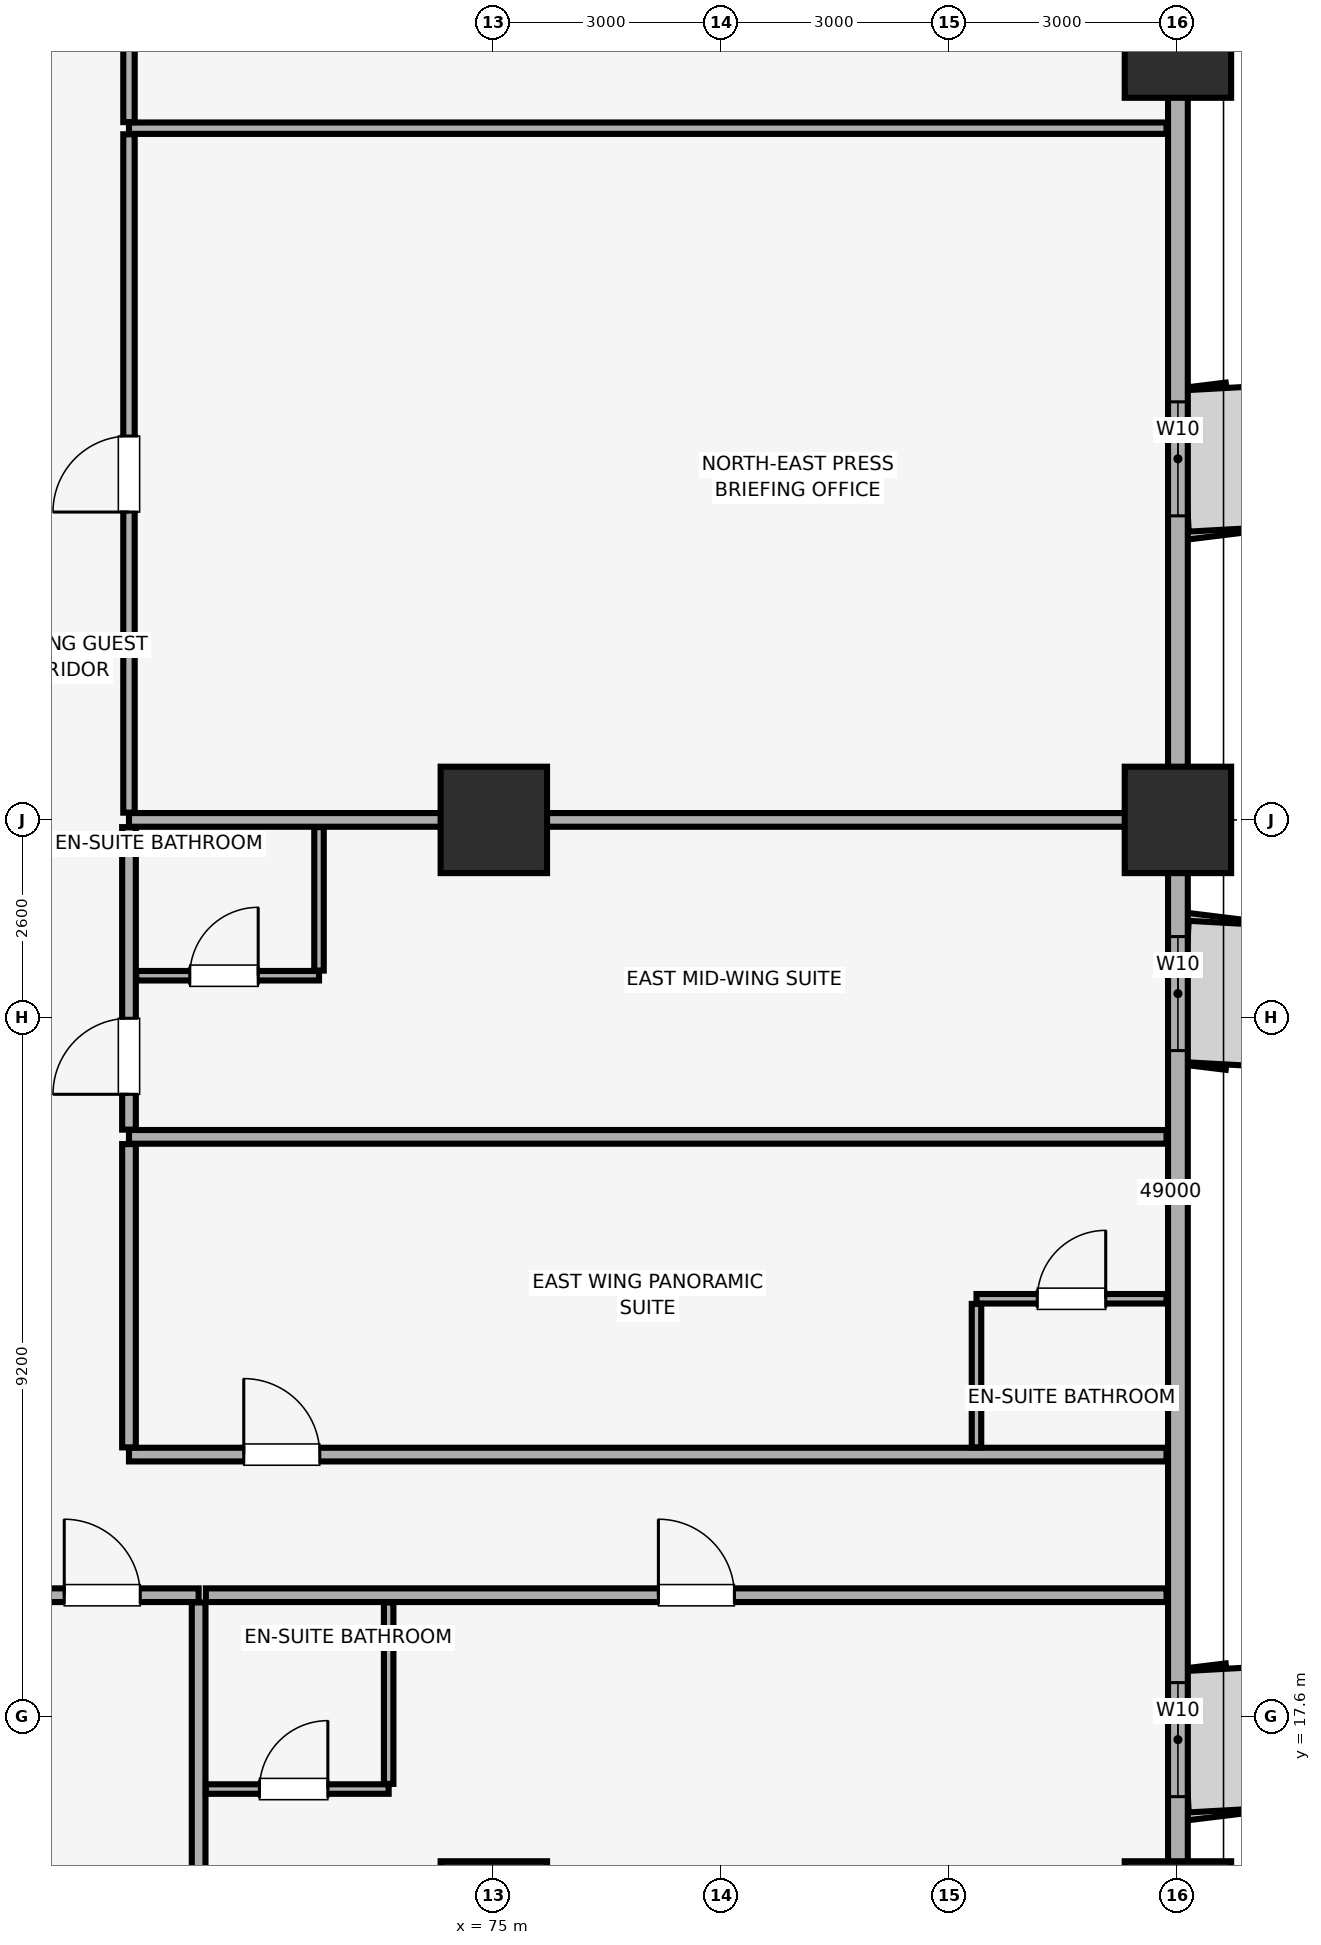
"""IFC4 building model, lengths in metres.
Left out: names, types, materials, properties, quantities, classifications, styles, units other than length and angle.
Written with IfcOpenShell. Run it as: python <this file> out.ifc"""

import sys

from ifc_helpers import new_model, si_unit, direction, frame, frame_2d, origin, origin_2d, place, context, subcontext, project, spatial, rectangle, extrude, element, fill, save


model = new_model("IFC4")
c1 = context("Model", 3, precision=1e-05, world=origin(), true_north=direction((0.0, 1.0)))
c2 = subcontext(c1, "Body", "Model", "MODEL_VIEW")
j1 = project(units=[si_unit("LENGTHUNIT", "METRE"), si_unit("PLANEANGLEUNIT", "RADIAN")], contexts=[c1])
p1 = place(None, origin())
s1 = spatial("IfcSite", under=j1, at=p1, CompositionType="ELEMENT")
p2 = place(p1, origin())
s2 = spatial("IfcBuilding", under=s1, at=p2, CompositionType="ELEMENT")
p3 = place(p2, frame((0.0, 0.0, 72.65)))
s3 = spatial("IfcBuildingStorey", under=s2, at=p3, CompositionType="ELEMENT", Elevation=72.65)
for number, where, z_axis, x_axis in (
    (1, (84.0, 15.0, 0.0), (0.0, 0.0, 1.0), (1.0, 0.0, 0.0)),
    (2, (84.0, 29.4, 0.0), (0.0, 0.0, 1.0), (1.0, 0.0, 0.0)),
    (3, (84.0, 39.6, 0.0), (0.0, 0.0, 1.0), (1.0, 0.0, 0.0)),
    (4, (75.0, 15.0, 0.0), (0.0, 0.0, 1.0), (1.0, 0.0, 0.0)),
    (5, (75.0, 29.4, 0.0), (0.0, 0.0, 1.0), (1.0, 0.0, 0.0)),
):
    element("IfcColumn", number, at=place(p3, frame(where, z_axis=z_axis, x_axis=x_axis)), inside=s3, PredefinedType="COLUMN", context=c2, shape_type="SweptSolid", body=[
        extrude(rectangle(XDim=1.4, YDim=1.4, at=origin_2d()), origin(), (0.0, 0.0, 1.0), 3.51),
    ])
p4 = place(p3, frame((84.0, 4.2, 0.0), z_axis=(0.0, 0.0, 1.0), x_axis=(0.0, 1.0, 0.0)))
e6 = element("IfcWall", 6, at=p4, inside=s3, PredefinedType="SOLIDWALL", context=c2, shape_type="SweptSolid", body=[
    extrude(rectangle(XDim=40.6, YDim=0.26, at=frame_2d((20.3, 0.0))), origin(), (0.0, 0.0, 1.0), 2.56),
])
p5 = place(p4, frame((6.05, 0.0, 0.85)))
e7 = element("IfcOpeningElement", 7, at=p5, cuts=e6, PredefinedType="OPENING", context=c2, shape_type="SweptSolid", body=[
    extrude(rectangle(XDim=1.5, YDim=1.4, at=frame_2d((0.75, 0.7))), frame((0.0, 0.14, 0.0), z_axis=(0.0, -1.0, 0.0), x_axis=(1.0, 0.0, 0.0)), (0.0, 0.0, 1.0), 0.28),
])
p6 = place(p4, frame((12.35, 0.0, 0.85)))
e8 = element("IfcOpeningElement", 8, at=p6, cuts=e6, PredefinedType="OPENING", context=c2, shape_type="SweptSolid", body=[
    extrude(rectangle(XDim=1.5, YDim=1.4, at=frame_2d((0.75, 0.7))), frame((0.0, 0.14, 0.0), z_axis=(0.0, -1.0, 0.0), x_axis=(1.0, 0.0, 0.0)), (0.0, 0.0, 1.0), 0.28),
])
p7 = place(p4, frame((22.165, 0.0, 0.85)))
e9 = element("IfcOpeningElement", 9, at=p7, cuts=e6, PredefinedType="OPENING", context=c2, shape_type="SweptSolid", body=[
    extrude(rectangle(XDim=1.5, YDim=1.4, at=frame_2d((0.75, 0.7))), frame((0.0, 0.14, 0.0), z_axis=(0.0, -1.0, 0.0), x_axis=(1.0, 0.0, 0.0)), (0.0, 0.0, 1.0), 0.28),
])
p8 = place(p4, frame((29.2, 0.0, 0.85)))
e10 = element("IfcOpeningElement", 10, at=p8, cuts=e6, PredefinedType="OPENING", context=c2, shape_type="SweptSolid", body=[
    extrude(rectangle(XDim=1.5, YDim=1.4, at=frame_2d((0.75, 0.7))), frame((0.0, 0.14, 0.0), z_axis=(0.0, -1.0, 0.0), x_axis=(1.0, 0.0, 0.0)), (0.0, 0.0, 1.0), 0.28),
])
p9 = place(p4, frame((37.365, 0.0, 0.85)))
e11 = element("IfcOpeningElement", 11, at=p9, cuts=e6, PredefinedType="OPENING", context=c2, shape_type="SweptSolid", body=[
    extrude(rectangle(XDim=1.5, YDim=1.4, at=frame_2d((0.75, 0.7))), frame((0.0, 0.14, 0.0), z_axis=(0.0, -1.0, 0.0), x_axis=(1.0, 0.0, 0.0)), (0.0, 0.0, 1.0), 0.28),
])
p10 = place(p3, frame((62.878, 19.2, 0.0), z_axis=(0.0, 0.0, 1.0), x_axis=(1.0, 0.0, 0.0)))
e12 = element("IfcWall", 12, at=p10, inside=s3, PredefinedType="PARTITIONING", context=c2, shape_type="SweptSolid", body=[
    extrude(rectangle(XDim=8.238, YDim=0.18, at=frame_2d((4.119, 0.0))), origin(), (0.0, 0.0, 1.0), 3.51),
])
p11 = place(p10, frame((6.47, 0.0, 0.0)))
e13 = element("IfcOpeningElement", 13, at=p11, cuts=e12, PredefinedType="OPENING", context=c2, shape_type="SweptSolid", body=[
    extrude(rectangle(XDim=1.0, YDim=2.15, at=frame_2d((0.5, 1.075))), frame((0.0, 0.1, 0.0), z_axis=(0.0, -1.0, 0.0), x_axis=(1.0, 0.0, 0.0)), (0.0, 0.0, 1.0), 0.2),
])
p12 = place(p3, frame((71.116, 0.15, 0.0), z_axis=(0.0, 0.0, 1.0), x_axis=(0.0, 1.0, 0.0)))
e14 = element("IfcWall", 14, at=p12, inside=s3, PredefinedType="PARTITIONING", context=c2, shape_type="SweptSolid", body=[
    extrude(rectangle(XDim=18.955, YDim=0.18, at=frame_2d((9.478, 0.0))), origin(), (0.0, 0.0, 1.0), 2.898),
])
p13 = place(p3, frame((71.211, 19.2, 0.0), z_axis=(0.0, 0.0, 1.0), x_axis=(1.0, 0.0, 0.0)))
e15 = element("IfcWall", 15, at=p13, inside=s3, PredefinedType="PARTITIONING", context=c2, shape_type="SweptSolid", body=[
    extrude(rectangle(XDim=12.639, YDim=0.18, at=frame_2d((6.319, 0.0))), origin(), (0.0, 0.0, 1.0), 3.51),
])
p14 = place(p13, frame((5.954, 0.0, 0.0)))
e16 = element("IfcOpeningElement", 16, at=p14, cuts=e15, PredefinedType="OPENING", context=c2, shape_type="SweptSolid", body=[
    extrude(rectangle(XDim=1.0, YDim=2.15, at=frame_2d((0.5, 1.075))), frame((0.0, 0.1, 0.0), z_axis=(0.0, -1.0, 0.0), x_axis=(1.0, 0.0, 0.0)), (0.0, 0.0, 1.0), 0.2),
])
p15 = place(p3, frame((71.211, 16.65, 0.0), z_axis=(0.0, 0.0, 1.0), x_axis=(1.0, 0.0, 0.0)))
e17 = element("IfcWall", 17, at=p15, inside=s3, PredefinedType="PARTITIONING", context=c2, shape_type="SweptSolid", body=[
    extrude(rectangle(XDim=2.405, YDim=0.125, at=frame_2d((1.203, 0.0))), origin(), (0.0, 0.0, 1.0), 3.51),
])
p16 = place(p15, frame((0.705, 0.0, 0.0)))
e18 = element("IfcOpeningElement", 18, at=p16, cuts=e17, PredefinedType="OPENING", context=c2, shape_type="SweptSolid", body=[
    extrude(rectangle(XDim=0.9, YDim=2.1, at=frame_2d((0.45, 1.05))), frame((0.0, 0.073, 0.0), z_axis=(0.0, -1.0, 0.0), x_axis=(1.0, 0.0, 0.0)), (0.0, 0.0, 1.0), 0.145),
])
p17 = place(p3, frame((73.616, 16.718, 0.0), z_axis=(0.0, 0.0, 1.0), x_axis=(0.0, 1.0, 0.0)))
e19 = element("IfcWall", 19, at=p17, inside=s3, PredefinedType="PARTITIONING", context=c2, shape_type="SweptSolid", body=[
    extrude(rectangle(XDim=2.387, YDim=0.125, at=frame_2d((1.194, 0.0))), origin(), (0.0, 0.0, 1.0), 3.51),
])
p18 = place(p3, frame((70.2, 21.05, 0.0), z_axis=(0.0, 0.0, 1.0), x_axis=(1.0, 0.0, 0.0)))
e20 = element("IfcWall", 20, at=p18, inside=s3, PredefinedType="PARTITIONING", context=c2, shape_type="SweptSolid", body=[
    extrude(rectangle(XDim=13.65, YDim=0.18, at=frame_2d((6.825, 0.0))), origin(), (0.0, 0.0, 1.0), 3.51),
])
p19 = place(p18, frame((1.51, 0.0, 0.0)))
e21 = element("IfcOpeningElement", 21, at=p19, cuts=e20, PredefinedType="OPENING", context=c2, shape_type="SweptSolid", body=[
    extrude(rectangle(XDim=1.0, YDim=2.15, at=frame_2d((0.5, 1.075))), frame((0.0, 0.1, 0.0), z_axis=(0.0, -1.0, 0.0), x_axis=(1.0, 0.0, 0.0)), (0.0, 0.0, 1.0), 0.2),
])
p20 = place(p3, frame((70.2, 25.23, 0.0), z_axis=(0.0, 0.0, 1.0), x_axis=(1.0, 0.0, 0.0)))
e22 = element("IfcWall", 22, at=p20, inside=s3, PredefinedType="PARTITIONING", context=c2, shape_type="SweptSolid", body=[
    extrude(rectangle(XDim=13.65, YDim=0.18, at=frame_2d((6.825, 0.0))), origin(), (0.0, 0.0, 1.0), 3.51),
])
p21 = place(p3, frame((70.2, 21.145, 0.0), z_axis=(0.0, 0.0, 1.0), x_axis=(0.0, 1.0, 0.0)))
e23 = element("IfcWall", 23, at=p21, inside=s3, PredefinedType="PARTITIONING", context=c2, shape_type="SweptSolid", body=[
    extrude(rectangle(XDim=3.99, YDim=0.18, at=frame_2d((1.995, 0.0))), origin(), (0.0, 0.0, 1.0), 3.51),
])
p22 = place(p3, frame((81.35, 23.1, 0.0), z_axis=(0.0, 0.0, 1.0), x_axis=(1.0, 0.0, 0.0)))
e24 = element("IfcWall", 24, at=p22, inside=s3, PredefinedType="PARTITIONING", context=c2, shape_type="SweptSolid", body=[
    extrude(rectangle(XDim=2.5, YDim=0.125, at=frame_2d((1.25, 0.0))), origin(), (0.0, 0.0, 1.0), 3.51),
])
p23 = place(p22, frame((0.8, 0.0, 0.0)))
e25 = element("IfcOpeningElement", 25, at=p23, cuts=e24, PredefinedType="OPENING", context=c2, shape_type="SweptSolid", body=[
    extrude(rectangle(XDim=0.9, YDim=2.1, at=frame_2d((0.45, 1.05))), frame((0.0, 0.073, 0.0), z_axis=(0.0, -1.0, 0.0), x_axis=(1.0, 0.0, 0.0)), (0.0, 0.0, 1.0), 0.145),
])
p24 = place(p3, frame((81.35, 21.145, 0.0), z_axis=(0.0, 0.0, 1.0), x_axis=(0.0, 1.0, 0.0)))
e26 = element("IfcWall", 26, at=p24, inside=s3, PredefinedType="PARTITIONING", context=c2, shape_type="SweptSolid", body=[
    extrude(rectangle(XDim=1.887, YDim=0.125, at=frame_2d((0.944, 0.0))), origin(), (0.0, 0.0, 1.0), 3.51),
])
p25 = place(p3, frame((70.2, 29.4, 0.0), z_axis=(0.0, 0.0, 1.0), x_axis=(1.0, 0.0, 0.0)))
e27 = element("IfcWall", 27, at=p25, inside=s3, PredefinedType="PARTITIONING", context=c2, shape_type="SweptSolid", body=[
    extrude(rectangle(XDim=13.65, YDim=0.18, at=frame_2d((6.825, 0.0))), origin(), (0.0, 0.0, 1.0), 2.86),
])
p26 = place(p3, frame((70.2, 25.325, 0.0), z_axis=(0.0, 0.0, 1.0), x_axis=(0.0, 1.0, 0.0)))
e28 = element("IfcWall", 28, at=p26, inside=s3, PredefinedType="PARTITIONING", context=c2, shape_type="SweptSolid", body=[
    extrude(rectangle(XDim=3.98, YDim=0.18, at=frame_2d((1.99, 0.0))), origin(), (0.0, 0.0, 1.0), 3.51),
])
p27 = place(p26, frame((0.465, 0.0, 0.0)))
e29 = element("IfcOpeningElement", 29, at=p27, cuts=e28, PredefinedType="OPENING", context=c2, shape_type="SweptSolid", body=[
    extrude(rectangle(XDim=1.0, YDim=2.15, at=frame_2d((0.5, 1.075))), frame((0.0, 0.1, 0.0), z_axis=(0.0, -1.0, 0.0), x_axis=(1.0, 0.0, 0.0)), (0.0, 0.0, 1.0), 0.2),
])
p28 = place(p3, frame((70.295, 27.35, 0.0), z_axis=(0.0, 0.0, 1.0), x_axis=(1.0, 0.0, 0.0)))
e30 = element("IfcWall", 30, at=p28, inside=s3, PredefinedType="PARTITIONING", context=c2, shape_type="SweptSolid", body=[
    extrude(rectangle(XDim=2.405, YDim=0.125, at=frame_2d((1.203, 0.0))), origin(), (0.0, 0.0, 1.0), 3.51),
])
p29 = place(p28, frame((0.705, 0.0, 0.0)))
e31 = element("IfcOpeningElement", 31, at=p29, cuts=e30, PredefinedType="OPENING", context=c2, shape_type="SweptSolid", body=[
    extrude(rectangle(XDim=0.9, YDim=2.1, at=frame_2d((0.45, 1.05))), frame((0.0, 0.073, 0.0), z_axis=(0.0, -1.0, 0.0), x_axis=(1.0, 0.0, 0.0)), (0.0, 0.0, 1.0), 0.145),
])
p30 = place(p3, frame((72.7, 27.417, 0.0), z_axis=(0.0, 0.0, 1.0), x_axis=(0.0, 1.0, 0.0)))
e32 = element("IfcWall", 32, at=p30, inside=s3, PredefinedType="PARTITIONING", context=c2, shape_type="SweptSolid", body=[
    extrude(rectangle(XDim=1.887, YDim=0.125, at=frame_2d((0.944, 0.0))), origin(), (0.0, 0.0, 1.0), 3.51),
])
p31 = place(p3, frame((70.2, 38.5, 0.0), z_axis=(0.0, 0.0, 1.0), x_axis=(1.0, 0.0, 0.0)))
e33 = element("IfcWall", 33, at=p31, inside=s3, PredefinedType="PARTITIONING", context=c2, shape_type="SweptSolid", body=[
    extrude(rectangle(XDim=13.65, YDim=0.15, at=frame_2d((6.825, 0.0))), origin(), (0.0, 0.0, 1.0), 3.51),
])
p32 = place(p3, frame((70.2, 29.495, 0.0), z_axis=(0.0, 0.0, 1.0), x_axis=(0.0, 1.0, 0.0)))
e34 = element("IfcWall", 34, at=p32, inside=s3, PredefinedType="PARTITIONING", context=c2, shape_type="SweptSolid", body=[
    extrude(rectangle(XDim=8.925, YDim=0.15, at=frame_2d((4.462, 0.0))), origin(), (0.0, 0.0, 1.0), 3.51),
])
p33 = place(p32, frame((3.955, 0.0, 0.0)))
e35 = element("IfcOpeningElement", 35, at=p33, cuts=e34, PredefinedType="OPENING", context=c2, shape_type="SweptSolid", body=[
    extrude(rectangle(XDim=1.0, YDim=2.15, at=frame_2d((0.5, 1.075))), frame((0.0, 0.085, 0.0), z_axis=(0.0, -1.0, 0.0), x_axis=(1.0, 0.0, 0.0)), (0.0, 0.0, 1.0), 0.17),
])
p34 = place(p3, frame((70.2, 38.58, 0.0), z_axis=(0.0, 0.0, 1.0), x_axis=(0.0, 1.0, 0.0)))
e36 = element("IfcWall", 36, at=p34, inside=s3, PredefinedType="PARTITIONING", context=c2, shape_type="SweptSolid", body=[
    extrude(rectangle(XDim=10.27, YDim=0.15, at=frame_2d((5.135, 0.0))), origin(), (0.0, 0.0, 1.0), 3.51),
])
p35 = place(p34, frame((2.27, 0.0, 0.0)))
e37 = element("IfcOpeningElement", 37, at=p35, cuts=e36, PredefinedType="OPENING", context=c2, shape_type="SweptSolid", body=[
    extrude(rectangle(XDim=1.0, YDim=2.15, at=frame_2d((0.5, 1.075))), frame((0.0, 0.085, 0.0), z_axis=(0.0, -1.0, 0.0), x_axis=(1.0, 0.0, 0.0)), (0.0, 0.0, 1.0), 0.17),
])
p36 = place(p6, origin())
e38 = element("IfcWindow", 38, at=p36, inside=s3, PartitioningType="SINGLE_PANEL", PredefinedType="WINDOW", context=c2, shape_type="SweptSolid", body=[
    extrude(rectangle(XDim=1.5, YDim=1.4, at=frame_2d((0.75, 0.7))), frame((0.0, 0.03, 0.0), z_axis=(0.0, -1.0, 0.0), x_axis=(1.0, 0.0, 0.0)), (0.0, 0.0, 1.0), 0.06),
])
fill(e8, e38)
p37 = place(p7, origin())
e39 = element("IfcWindow", 39, at=p37, inside=s3, PartitioningType="SINGLE_PANEL", PredefinedType="WINDOW", context=c2, shape_type="SweptSolid", body=[
    extrude(rectangle(XDim=1.5, YDim=1.4, at=frame_2d((0.75, 0.7))), frame((0.0, 0.03, 0.0), z_axis=(0.0, -1.0, 0.0), x_axis=(1.0, 0.0, 0.0)), (0.0, 0.0, 1.0), 0.06),
])
fill(e9, e39)
p38 = place(p8, origin())
e40 = element("IfcWindow", 40, at=p38, inside=s3, PartitioningType="SINGLE_PANEL", PredefinedType="WINDOW", context=c2, shape_type="SweptSolid", body=[
    extrude(rectangle(XDim=1.5, YDim=1.4, at=frame_2d((0.75, 0.7))), frame((0.0, 0.03, 0.0), z_axis=(0.0, -1.0, 0.0), x_axis=(1.0, 0.0, 0.0)), (0.0, 0.0, 1.0), 0.06),
])
fill(e10, e40)
p39 = place(p11, origin())
e41 = element("IfcDoor", 41, at=p39, inside=s3, OperationType="SINGLE_SWING_LEFT", PredefinedType="DOOR", context=c2, shape_type="SweptSolid", body=[
    extrude(rectangle(XDim=1.0, YDim=2.15, at=frame_2d((0.5, 1.075))), frame((0.0, 0.025, 0.0), z_axis=(0.0, -1.0, 0.0), x_axis=(1.0, 0.0, 0.0)), (0.0, 0.0, 1.0), 0.05),
])
fill(e13, e41)
p40 = place(p14, origin())
e42 = element("IfcDoor", 42, at=p40, inside=s3, OperationType="SINGLE_SWING_LEFT", PredefinedType="DOOR", context=c2, shape_type="SweptSolid", body=[
    extrude(rectangle(XDim=1.0, YDim=2.15, at=frame_2d((0.5, 1.075))), frame((0.0, 0.025, 0.0), z_axis=(0.0, -1.0, 0.0), x_axis=(1.0, 0.0, 0.0)), (0.0, 0.0, 1.0), 0.05),
])
fill(e16, e42)
p41 = place(p16, origin())
e43 = element("IfcDoor", 43, at=p41, inside=s3, OperationType="SINGLE_SWING_RIGHT", PredefinedType="DOOR", context=c2, shape_type="SweptSolid", body=[
    extrude(rectangle(XDim=0.9, YDim=2.1, at=frame_2d((0.45, 1.05))), frame((0.0, 0.025, 0.0), z_axis=(0.0, -1.0, 0.0), x_axis=(1.0, 0.0, 0.0)), (0.0, 0.0, 1.0), 0.05),
])
fill(e18, e43)
p42 = place(p19, origin())
e44 = element("IfcDoor", 44, at=p42, inside=s3, OperationType="SINGLE_SWING_LEFT", PredefinedType="DOOR", context=c2, shape_type="SweptSolid", body=[
    extrude(rectangle(XDim=1.0, YDim=2.15, at=frame_2d((0.5, 1.075))), frame((0.0, 0.025, 0.0), z_axis=(0.0, -1.0, 0.0), x_axis=(1.0, 0.0, 0.0)), (0.0, 0.0, 1.0), 0.05),
])
fill(e21, e44)
p43 = place(p23, origin())
e45 = element("IfcDoor", 45, at=p43, inside=s3, OperationType="SINGLE_SWING_RIGHT", PredefinedType="DOOR", context=c2, shape_type="SweptSolid", body=[
    extrude(rectangle(XDim=0.9, YDim=2.1, at=frame_2d((0.45, 1.05))), frame((0.0, 0.025, 0.0), z_axis=(0.0, -1.0, 0.0), x_axis=(1.0, 0.0, 0.0)), (0.0, 0.0, 1.0), 0.05),
])
fill(e25, e45)
p44 = place(p27, origin())
e46 = element("IfcDoor", 46, at=p44, inside=s3, OperationType="SINGLE_SWING_LEFT", PredefinedType="DOOR", context=c2, shape_type="SweptSolid", body=[
    extrude(rectangle(XDim=1.0, YDim=2.15, at=frame_2d((0.5, 1.075))), frame((0.0, 0.025, 0.0), z_axis=(0.0, -1.0, 0.0), x_axis=(1.0, 0.0, 0.0)), (0.0, 0.0, 1.0), 0.05),
])
fill(e29, e46)
p45 = place(p29, origin())
e47 = element("IfcDoor", 47, at=p45, inside=s3, OperationType="SINGLE_SWING_RIGHT", PredefinedType="DOOR", context=c2, shape_type="SweptSolid", body=[
    extrude(rectangle(XDim=0.9, YDim=2.1, at=frame_2d((0.45, 1.05))), frame((0.0, 0.025, 0.0), z_axis=(0.0, -1.0, 0.0), x_axis=(1.0, 0.0, 0.0)), (0.0, 0.0, 1.0), 0.05),
])
fill(e31, e47)
p46 = place(p33, origin())
e48 = element("IfcDoor", 48, at=p46, inside=s3, OperationType="SINGLE_SWING_LEFT", PredefinedType="DOOR", context=c2, shape_type="SweptSolid", body=[
    extrude(rectangle(XDim=1.0, YDim=2.15, at=frame_2d((0.5, 1.075))), frame((0.0, 0.025, 0.0), z_axis=(0.0, -1.0, 0.0), x_axis=(1.0, 0.0, 0.0)), (0.0, 0.0, 1.0), 0.05),
])
fill(e35, e48)
save(model, sys.argv[1])
